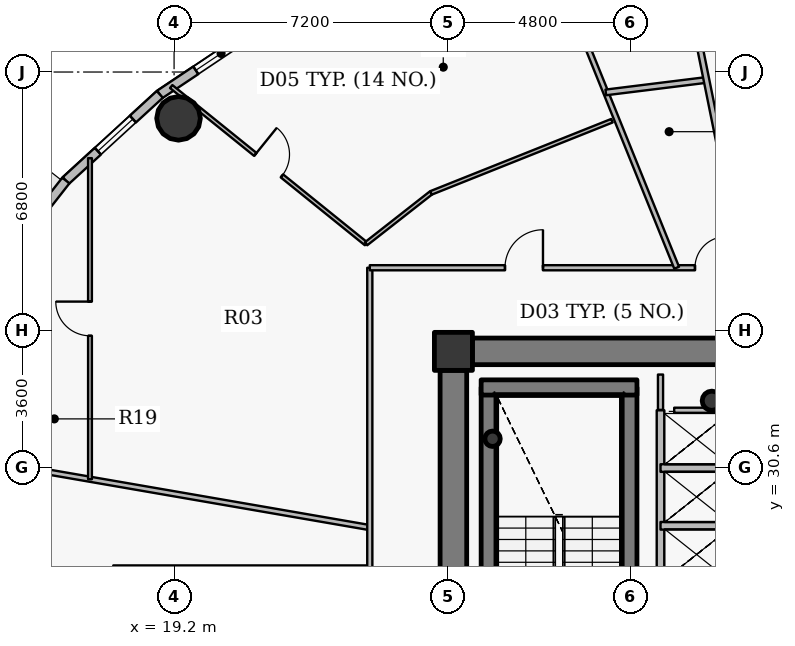
"""IFC4 building model, lengths in metres.
Left out: names, types, materials, properties, quantities, classifications, styles, units other than length and angle.
Written with IfcOpenShell. Run it as: python <this file> out.ifc"""

import sys

from ifc_helpers import new_model, si_unit, direction, frame, frame_2d, origin, origin_2d, place, context, subcontext, project, spatial, rectangle, hollow_circle, extrude, source, transform, mapped, element, fill, save


model = new_model("IFC4")
c1 = context("Model", 3, precision=1e-05, world=origin(), true_north=direction((0.0, 1.0)))
c2 = subcontext(c1, "Body", "Model", "MODEL_VIEW")
j1 = project(units=[si_unit("LENGTHUNIT", "METRE"), si_unit("PLANEANGLEUNIT", "RADIAN")], contexts=[c1])
p1 = place(None, origin())
s1 = spatial("IfcSite", under=j1, at=p1, CompositionType="ELEMENT")
p2 = place(p1, origin())
s2 = spatial("IfcBuilding", under=s1, at=p2, CompositionType="ELEMENT")
p3 = place(p2, frame((0.0, 0.0, 225.3)))
s3 = spatial("IfcBuildingStorey", under=s2, at=p3, CompositionType="ELEMENT", Elevation=225.3)
p4 = place(p3, frame((26.55, 33.65, 0.0), z_axis=(0.0, 0.0, 1.0), x_axis=(1.0, 0.0, 0.0)))
e1 = element("IfcColumn", 1, at=p4, inside=s3, PredefinedType="COLUMN", context=c2, shape_type="SweptSolid", body=[
    extrude(rectangle(XDim=1.0, YDim=1.0, at=origin_2d()), origin(), (0.0, 0.0, 1.0), 3.75),
])
p5 = place(p3, frame((33.35, 32.35, 0.0), z_axis=(0.0, 0.0, 1.0), x_axis=(1.0, 0.0, 0.0)))
e2 = element("IfcColumn", 2, at=p5, inside=s3, PredefinedType="COLUMN", context=c2, shape_type="SweptSolid", body=[
    extrude(hollow_circle(Radius=0.254, WallThickness=0.02, at=origin_2d()), origin(), (0.0, 0.0, 1.0), 3.75),
])
p6 = place(p3, frame((27.48, 24.1, 0.0), z_axis=(0.0, 0.0, 1.0), x_axis=(0.0, 1.0, 0.0)))
e3 = element("IfcWall", 3, at=p6, inside=s3, PredefinedType="SHEAR", context=c2, shape_type="SweptSolid", body=[
    extrude(rectangle(XDim=8.6, YDim=0.4, at=frame_2d((4.3, 0.0))), origin(), (0.0, 0.0, 1.0), 3.75),
])
p7 = place(p3, frame((31.18, 27.8, 0.0), z_axis=(0.0, 0.0, 1.0), x_axis=(0.0, 1.0, 0.0)))
e4 = element("IfcWall", 4, at=p7, inside=s3, PredefinedType="SHEAR", context=c2, shape_type="SweptSolid", body=[
    extrude(rectangle(XDim=4.9, YDim=0.4, at=frame_2d((2.45, 0.0))), origin(), (0.0, 0.0, 1.0), 3.75),
])
p8 = place(p3, frame((27.28, 32.7, 0.0), z_axis=(0.0, 0.0, 1.0), x_axis=(1.0, 0.0, 0.0)))
e5 = element("IfcWall", 5, at=p8, inside=s3, PredefinedType="SHEAR", context=c2, shape_type="SweptSolid", body=[
    extrude(rectangle(XDim=4.1, YDim=0.4, at=frame_2d((2.05, 0.0))), origin(), (0.0, 0.0, 1.0), 3.75),
])
p9 = place(p3, frame((27.58, 31.35, 0.0), z_axis=(0.0, 0.0, 1.0), x_axis=(1.0, 0.0, 0.0)))
e6 = element("IfcColumn", 6, at=p9, inside=s3, PredefinedType="COLUMN", context=c2, shape_type="SweptSolid", body=[
    extrude(hollow_circle(Radius=0.203, WallThickness=0.016, at=origin_2d()), origin(), (0.0, 0.0, 1.0), 3.75),
])
p10 = place(p3, frame((27.05, 33.65, 0.0), z_axis=(0.0, 0.0, 1.0), x_axis=(1.0, 0.0, 0.0)))
e7 = element("IfcWall", 7, at=p10, inside=s3, PredefinedType="SHEAR", context=c2, shape_type="SweptSolid", body=[
    extrude(rectangle(XDim=17.9, YDim=0.7, at=frame_2d((8.95, 0.0))), origin(), (0.0, 0.0, 1.0), 3.05),
])
p11 = place(p10, frame((13.675, 0.0, 0.0)))
e8 = element("IfcOpeningElement", 8, at=p11, cuts=e7, PredefinedType="OPENING", context=c2, shape_type="SweptSolid", body=[
    extrude(rectangle(XDim=1.15, YDim=2.15, at=origin_2d()), frame((0.575, 0.36, 1.075), z_axis=(0.0, -1.0, 0.0), x_axis=(1.0, 0.0, 0.0)), (0.0, 0.0, 1.0), 0.72),
])
p12 = place(p3, frame((26.55, 20.85, 0.0), z_axis=(0.0, 0.0, 1.0), x_axis=(0.0, 1.0, 0.0)))
e9 = element("IfcWall", 9, at=p12, inside=s3, PredefinedType="SHEAR", context=c2, shape_type="SweptSolid", body=[
    extrude(rectangle(XDim=12.3, YDim=0.7, at=frame_2d((6.15, 0.0))), origin(), (0.0, 0.0, 1.0), 3.05),
])
p13 = place(p12, frame((1.085, 0.0, 0.0)))
e10 = element("IfcOpeningElement", 10, at=p13, cuts=e9, PredefinedType="OPENING", context=c2, shape_type="SweptSolid", body=[
    extrude(rectangle(XDim=1.15, YDim=2.15, at=origin_2d()), frame((0.575, 0.36, 1.075), z_axis=(0.0, -1.0, 0.0), x_axis=(1.0, 0.0, 0.0)), (0.0, 0.0, 1.0), 0.72),
])
p14 = place(p3, frame((19.317, 39.781, 0.0), z_axis=(0.0, 0.0, 1.0), x_axis=(1.0, 0.0, 0.0)))
e11 = element("IfcColumn", 11, at=p14, inside=s3, PredefinedType="COLUMN", context=c2, shape_type="SweptSolid", body=[
    extrude(hollow_circle(Radius=0.575, WallThickness=0.036, at=origin_2d()), origin(), (0.0, 0.0, 1.0), 3.75),
])
p15 = place(p3, frame((18.824, 40.411, 0.0), z_axis=(0.0, 0.0, 1.0), x_axis=(0.831262496074, 0.555880079352, 0.0)))
e12 = element("IfcWall", 12, at=p15, inside=s3, PredefinedType="SOLIDWALL", context=c2, shape_type="SweptSolid", body=[
    extrude(rectangle(XDim=3.484, YDim=0.24, at=frame_2d((1.742, 0.0))), origin(), (0.0, 0.0, 1.0), 3.5),
])
p16 = place(p15, frame((1.14, 0.0, 0.9)))
e13 = element("IfcOpeningElement", 13, at=p16, cuts=e12, PredefinedType="OPENING", context=c2, shape_type="SweptSolid", body=[
    extrude(rectangle(XDim=1.6, YDim=1.75, at=origin_2d()), frame((0.8, 0.13, 0.875), z_axis=(0.0, -1.0, 0.0), x_axis=(1.0, 0.0, 0.0)), (0.0, 0.0, 1.0), 0.26),
])
p17 = place(p3, frame((16.352, 38.145, 0.0), z_axis=(0.0, 0.0, 1.0), x_axis=(0.737123922599, 0.675757591694, 0.0)))
e14 = element("IfcWall", 14, at=p17, inside=s3, PredefinedType="SOLIDWALL", context=c2, shape_type="SweptSolid", body=[
    extrude(rectangle(XDim=3.354, YDim=0.24, at=frame_2d((1.677, 0.0))), origin(), (0.0, 0.0, 1.0), 3.5),
])
p18 = place(p17, frame((1.144, 0.0, 0.9)))
e15 = element("IfcOpeningElement", 15, at=p18, cuts=e14, PredefinedType="OPENING", context=c2, shape_type="SweptSolid", body=[
    extrude(rectangle(XDim=1.25, YDim=1.65, at=origin_2d()), frame((0.625, 0.13, 0.825), z_axis=(0.0, -1.0, 0.0), x_axis=(1.0, 0.0, 0.0)), (0.0, 0.0, 1.0), 0.26),
])
p19 = place(p3, frame((14.364, 35.605, 0.0), z_axis=(0.0, 0.0, 1.0), x_axis=(0.616312344705, 0.787501805562, 0.0)))
e16 = element("IfcWall", 16, at=p19, inside=s3, PredefinedType="SOLIDWALL", context=c2, shape_type="SweptSolid", body=[
    extrude(rectangle(XDim=3.225, YDim=0.24, at=frame_2d((1.612, 0.0))), origin(), (0.0, 0.0, 1.0), 3.5),
])
p20 = place(p3, frame((12.361, 31.084, 0.0), z_axis=(0.0, 0.0, 1.0), x_axis=(0.98539748391, -0.17026978212, 0.0)))
e17 = element("IfcWall", 17, at=p20, inside=s3, PredefinedType="PARTITIONING", context=c2, shape_type="SweptSolid", body=[
    extrude(rectangle(XDim=12.166, YDim=0.135, at=frame_2d((6.083, 0.0))), origin(), (0.0, 0.0, 1.0), 2.985),
])
p21 = place(p3, frame((16.987, 30.285, 0.0), z_axis=(0.0, 0.0, 1.0), x_axis=(0.0, 1.0, 0.0)))
e18 = element("IfcWall", 18, at=p21, inside=s3, PredefinedType="PARTITIONING", context=c2, shape_type="SweptSolid", body=[
    extrude(rectangle(XDim=8.449, YDim=0.1, at=frame_2d((4.224, 0.0))), origin(), (0.0, 0.0, 1.0), 2.935),
])
p22 = place(p21, frame((3.774, 0.0, 0.0)))
e19 = element("IfcOpeningElement", 19, at=p22, cuts=e18, PredefinedType="OPENING", context=c2, shape_type="SweptSolid", body=[
    extrude(rectangle(XDim=0.9, YDim=2.1, at=origin_2d()), frame((0.45, 0.06, 1.05), z_axis=(0.0, -1.0, 0.0), x_axis=(1.0, 0.0, 0.0)), (0.0, 0.0, 1.0), 0.12),
])
p23 = place(p3, frame((17.6, 27.95, 0.0), z_axis=(0.0, 0.0, 1.0), x_axis=(1.0, 0.0, 0.0)))
e20 = element("IfcWall", 20, at=p23, inside=s3, PredefinedType="PARTITIONING", context=c2, shape_type="SweptSolid", body=[
    extrude(rectangle(XDim=6.75, YDim=0.135, at=frame_2d((3.375, 0.0))), origin(), (0.0, 0.0, 1.0), 3.5),
])
p24 = place(p3, frame((19.124, 40.618, 0.0), z_axis=(0.0, 0.0, 1.0), x_axis=(0.778207956818, -0.62800666871, 0.0)))
e21 = element("IfcWall", 21, at=p24, inside=s3, PredefinedType="PARTITIONING", context=c2, shape_type="SweptSolid", body=[
    extrude(rectangle(XDim=6.588, YDim=0.1, at=frame_2d((3.294, 0.0))), origin(), (0.0, 0.0, 1.0), 2.985),
])
p25 = place(p24, frame((2.844, 0.0, 0.0)))
e22 = element("IfcOpeningElement", 22, at=p25, cuts=e21, PredefinedType="OPENING", context=c2, shape_type="SweptSolid", body=[
    extrude(rectangle(XDim=0.9, YDim=2.1, at=origin_2d()), frame((0.45, 0.06, 1.05), z_axis=(0.0, -1.0, 0.0), x_axis=(1.0, 0.0, 0.0)), (0.0, 0.0, 1.0), 0.12),
])
p26 = place(p3, frame((24.251, 36.481, 0.0), z_axis=(0.0, 0.0, 1.0), x_axis=(0.787374491509, 0.616474987426, 0.0)))
e23 = element("IfcWall", 23, at=p26, inside=s3, PredefinedType="PARTITIONING", context=c2, shape_type="SweptSolid", body=[
    extrude(rectangle(XDim=2.171, YDim=0.1, at=frame_2d((1.086, 0.0))), origin(), (0.0, 0.0, 1.0), 3.5),
])
p27 = place(p3, frame((24.35, 27.95, 0.0), z_axis=(0.0, 0.0, 1.0), x_axis=(0.0, 1.0, 0.0)))
e24 = element("IfcWall", 24, at=p27, inside=s3, PredefinedType="PARTITIONING", context=c2, shape_type="SweptSolid", body=[
    extrude(rectangle(XDim=7.9, YDim=0.135, at=frame_2d((3.95, 0.0))), origin(), (0.0, 0.0, 1.0), 2.935),
])
p28 = place(p3, frame((24.35, 35.85, 0.0), z_axis=(0.0, 0.0, 1.0), x_axis=(1.0, 0.0, 0.0)))
e25 = element("IfcWall", 25, at=p28, inside=s3, PredefinedType="PARTITIONING", context=c2, shape_type="SweptSolid", body=[
    extrude(rectangle(XDim=26.218, YDim=0.135, at=frame_2d((13.109, 0.0))), origin(), (0.0, 0.0, 1.0), 2.935),
])
p29 = place(p28, frame((3.557, 0.0, 0.0)))
e26 = element("IfcOpeningElement", 26, at=p29, cuts=e25, PredefinedType="OPENING", context=c2, shape_type="SweptSolid", body=[
    extrude(rectangle(XDim=1.0, YDim=2.15, at=origin_2d()), frame((0.5, 0.078, 1.075), z_axis=(0.0, -1.0, 0.0), x_axis=(1.0, 0.0, 0.0)), (0.0, 0.0, 1.0), 0.155),
])
p30 = place(p28, frame((22.776, 0.0, 0.0)))
e27 = element("IfcOpeningElement", 27, at=p30, cuts=e25, PredefinedType="OPENING", context=c2, shape_type="SweptSolid", body=[
    extrude(rectangle(XDim=1.0, YDim=2.15, at=origin_2d()), frame((0.5, 0.078, 1.075), z_axis=(0.0, -1.0, 0.0), x_axis=(1.0, 0.0, 0.0)), (0.0, 0.0, 1.0), 0.155),
])
p31 = place(p28, frame((13.736, 0.0, 0.0)))
e28 = element("IfcOpeningElement", 28, at=p31, cuts=e25, PredefinedType="OPENING", context=c2, shape_type="SweptSolid", body=[
    extrude(rectangle(XDim=1.05, YDim=2.15, at=origin_2d()), frame((0.525, 0.078, 1.075), z_axis=(0.0, -1.0, 0.0), x_axis=(1.0, 0.0, 0.0)), (0.0, 0.0, 1.0), 0.155),
])
p32 = place(p28, frame((10.682, 0.0, 0.0)))
e29 = element("IfcOpeningElement", 29, at=p32, cuts=e25, PredefinedType="OPENING", context=c2, shape_type="SweptSolid", body=[
    extrude(rectangle(XDim=1.05, YDim=2.15, at=origin_2d()), frame((0.525, 0.078, 1.075), z_axis=(0.0, -1.0, 0.0), x_axis=(1.0, 0.0, 0.0)), (0.0, 0.0, 1.0), 0.155),
])
p33 = place(p28, frame((8.557, 0.0, 0.0)))
e30 = element("IfcOpeningElement", 30, at=p33, cuts=e25, PredefinedType="OPENING", context=c2, shape_type="SweptSolid", body=[
    extrude(rectangle(XDim=0.82, YDim=2.1, at=origin_2d()), frame((0.41, 0.078, 1.05), z_axis=(0.0, -1.0, 0.0), x_axis=(1.0, 0.0, 0.0)), (0.0, 0.0, 1.0), 0.155),
])
p34 = place(p3, frame((25.961, 37.819, 0.0), z_axis=(0.0, 0.0, 1.0), x_axis=(0.928801505367, 0.370577608105, 0.0)))
e31 = element("IfcWall", 31, at=p34, inside=s3, PredefinedType="PARTITIONING", context=c2, shape_type="SweptSolid", body=[
    extrude(rectangle(XDim=5.126, YDim=0.1, at=frame_2d((2.563, 0.0))), origin(), (0.0, 0.0, 1.0), 2.935),
])
p35 = place(p3, frame((28.691, 45.091, 0.0), z_axis=(0.0, 0.0, 1.0), x_axis=(0.37459385956, -0.927188999277, 0.0)))
e32 = element("IfcWall", 32, at=p35, inside=s3, PredefinedType="PARTITIONING", context=c2, shape_type="SweptSolid", body=[
    extrude(rectangle(XDim=9.967, YDim=0.135, at=frame_2d((4.984, 0.0))), origin(), (0.0, 0.0, 1.0), 2.935),
])
p36 = place(p3, frame((30.561, 40.463, 0.0), z_axis=(0.0, 0.0, 1.0), x_axis=(0.992402619978, 0.123032678023, 0.0)))
e33 = element("IfcWall", 33, at=p36, inside=s3, PredefinedType="PARTITIONING", context=c2, shape_type="SweptSolid", body=[
    extrude(rectangle(XDim=2.669, YDim=0.15, at=frame_2d((1.334, 0.0))), origin(), (0.0, 0.0, 1.0), 3.5),
])
p37 = place(p3, frame((32.0, 24.1, 0.0), z_axis=(0.0, 0.0, 1.0), x_axis=(0.0, 1.0, 0.0)))
e34 = element("IfcWall", 34, at=p37, inside=s3, PredefinedType="PARTITIONING", context=c2, shape_type="SweptSolid", body=[
    extrude(rectangle(XDim=8.0, YDim=0.2, at=frame_2d((4.0, 0.0))), origin(), (0.0, 0.0, 1.0), 3.5),
])
for number, where, z_axis, x_axis in (
    (35, (32.0, 29.06, 0.0), (0.0, 0.0, 1.0), (1.0, 0.0, 0.0)),
    (36, (32.0, 30.58, 0.0), (0.0, 0.0, 1.0), (1.0, 0.0, 0.0)),
):
    element("IfcWall", number, at=place(p3, frame(where, z_axis=z_axis, x_axis=x_axis)), inside=s3, PredefinedType="PARTITIONING", context=c2, shape_type="SweptSolid", body=[
        extrude(rectangle(XDim=1.9, YDim=0.2, at=frame_2d((0.95, 0.0))), origin(), (0.0, 0.0, 1.0), 3.085),
    ])
p38 = place(p3, frame((32.206, 45.751, 0.0), z_axis=(0.0, 0.0, 1.0), x_axis=(0.198323299654, -0.980136658234, 0.0)))
e37 = element("IfcWall", 37, at=p38, inside=s3, PredefinedType="PARTITIONING", context=c2, shape_type="SweptSolid", body=[
    extrude(rectangle(XDim=10.102, YDim=0.15, at=frame_2d((5.051, 0.0))), origin(), (0.0, 0.0, 1.0), 2.985),
])
p39 = place(p38, frame((2.025, 0.0, 0.0)))
e38 = element("IfcOpeningElement", 38, at=p39, cuts=e37, PredefinedType="OPENING", context=c2, shape_type="SweptSolid", body=[
    extrude(rectangle(XDim=1.05, YDim=2.15, at=origin_2d()), frame((0.525, 0.085, 1.075), z_axis=(0.0, -1.0, 0.0), x_axis=(1.0, 0.0, 0.0)), (0.0, 0.0, 1.0), 0.17),
])
p40 = place(p3, frame((32.36, 32.1, 0.0), z_axis=(0.0, 0.0, 1.0), x_axis=(1.0, 0.0, 0.0)))
e39 = element("IfcWall", 39, at=p40, inside=s3, PredefinedType="PARTITIONING", context=c2, shape_type="SweptSolid", body=[
    extrude(rectangle(XDim=1.18, YDim=0.135, at=frame_2d((0.59, 0.0))), origin(), (0.0, 0.0, 1.0), 3.085),
])
p41 = place(p3, frame((32.0, 33.04, 0.0), z_axis=(0.0, 0.0, 1.0), x_axis=(0.0, -1.0, 0.0)))
e40 = element("IfcWall", 40, at=p41, inside=s3, PredefinedType="PARTITIONING", context=c2, shape_type="SweptSolid", body=[
    extrude(rectangle(XDim=0.93, YDim=0.135, at=frame_2d((0.465, 0.0))), origin(), (0.0, 0.0, 1.0), 3.035),
])
p42 = place(p3, frame((27.04, 34.0, 0.0), z_axis=(0.0, 0.0, 1.0), x_axis=(-1.0, 0.0, 0.0)))
e41 = element("IfcWall", 41, at=p42, inside=s3, PredefinedType="PARTITIONING", context=c2, shape_type="SweptSolid", body=[
    extrude(rectangle(XDim=0.84, YDim=0.135, at=frame_2d((0.42, 0.0))), origin(), (0.0, 0.0, 1.0), 2.935),
])
p43 = place(p3, frame((26.2, 33.692, 0.0), z_axis=(0.0, 0.0, 1.0), x_axis=(0.0, -1.0, 0.0)))
e42 = element("IfcWall", 42, at=p43, inside=s3, PredefinedType="PARTITIONING", context=c2, shape_type="SweptSolid", body=[
    extrude(rectangle(XDim=0.532, YDim=0.135, at=frame_2d((0.266, 0.0))), origin(), (0.0, 0.0, 1.0), 3.5),
])
m1 = source(origin(), c2, "Body", "SweptSolid", [
    extrude(rectangle(XDim=1.6, YDim=1.75, at=origin_2d()), frame((0.8, 0.03, 0.875), z_axis=(0.0, -1.0, 0.0), x_axis=(1.0, 0.0, 0.0)), (0.0, 0.0, 1.0), 0.06),
])
p44 = place(p16, origin())
e43 = element("IfcWindow", 43, at=p44, inside=s3, PartitioningType="DOUBLE_PANEL_VERTICAL", PredefinedType="WINDOW", context=c2, shape_type="MappedRepresentation", body=[
    mapped(m1, transform((0.0, 0.0, 0.0), x_axis=(1.0, 0.0, 0.0), y_axis=(0.0, 1.0, 0.0), z_axis=(0.0, 0.0, 1.0), scale=1.0)),
])
fill(e13, e43)
m2 = source(origin(), c2, "Body", "SweptSolid", [
    extrude(rectangle(XDim=1.25, YDim=1.65, at=origin_2d()), frame((0.625, 0.03, 0.825), z_axis=(0.0, -1.0, 0.0), x_axis=(1.0, 0.0, 0.0)), (0.0, 0.0, 1.0), 0.06),
])
p45 = place(p18, origin())
e44 = element("IfcWindow", 44, at=p45, inside=s3, PartitioningType="SINGLE_PANEL", PredefinedType="WINDOW", context=c2, shape_type="MappedRepresentation", body=[
    mapped(m2, transform((0.0, 0.0, 0.0), x_axis=(1.0, 0.0, 0.0), y_axis=(0.0, 1.0, 0.0), z_axis=(0.0, 0.0, 1.0), scale=1.0)),
])
fill(e15, e44)
m3 = source(origin(), c2, "Body", "SweptSolid", [
    extrude(rectangle(XDim=1.0, YDim=2.15, at=origin_2d()), frame((0.5, 0.025, 1.075), z_axis=(0.0, -1.0, 0.0), x_axis=(1.0, 0.0, 0.0)), (0.0, 0.0, 1.0), 0.05),
])
p46 = place(p29, origin())
e45 = element("IfcDoor", 45, at=p46, inside=s3, OperationType="SINGLE_SWING_RIGHT", PredefinedType="DOOR", context=c2, shape_type="MappedRepresentation", body=[
    mapped(m3, transform((0.0, 0.0, 0.0), x_axis=(1.0, 0.0, 0.0), y_axis=(0.0, 1.0, 0.0), z_axis=(0.0, 0.0, 1.0), scale=1.0)),
])
fill(e26, e45)
m4 = source(origin(), c2, "Body", "SweptSolid", [
    extrude(rectangle(XDim=0.9, YDim=2.1, at=origin_2d()), frame((0.45, 0.025, 1.05), z_axis=(0.0, -1.0, 0.0), x_axis=(1.0, 0.0, 0.0)), (0.0, 0.0, 1.0), 0.05),
])
p47 = place(p25, origin())
e46 = element("IfcDoor", 46, at=p47, inside=s3, OperationType="SINGLE_SWING_LEFT", PredefinedType="DOOR", context=c2, shape_type="MappedRepresentation", body=[
    mapped(m4, transform((0.0, 0.0, 0.0), x_axis=(1.0, 0.0, 0.0), y_axis=(0.0, 1.0, 0.0), z_axis=(0.0, 0.0, 1.0), scale=1.0)),
])
fill(e22, e46)
p48 = place(p22, origin())
e47 = element("IfcDoor", 47, at=p48, inside=s3, OperationType="SINGLE_SWING_RIGHT", PredefinedType="DOOR", context=c2, shape_type="MappedRepresentation", body=[
    mapped(m4, transform((0.0, 0.0, 0.0), x_axis=(1.0, 0.0, 0.0), y_axis=(0.0, 1.0, 0.0), z_axis=(0.0, 0.0, 1.0), scale=1.0)),
])
fill(e19, e47)
m5 = source(origin(), c2, "Body", "SweptSolid", [
    extrude(rectangle(XDim=0.82, YDim=2.1, at=origin_2d()), frame((0.41, 0.025, 1.05), z_axis=(0.0, -1.0, 0.0), x_axis=(1.0, 0.0, 0.0)), (0.0, 0.0, 1.0), 0.05),
])
p49 = place(p33, origin())
e48 = element("IfcDoor", 48, at=p49, inside=s3, OperationType="SINGLE_SWING_RIGHT", PredefinedType="DOOR", context=c2, shape_type="MappedRepresentation", body=[
    mapped(m5, transform((0.0, 0.0, 0.0), x_axis=(1.0, 0.0, 0.0), y_axis=(0.0, 1.0, 0.0), z_axis=(0.0, 0.0, 1.0), scale=1.0)),
])
fill(e30, e48)
save(model, sys.argv[1])
